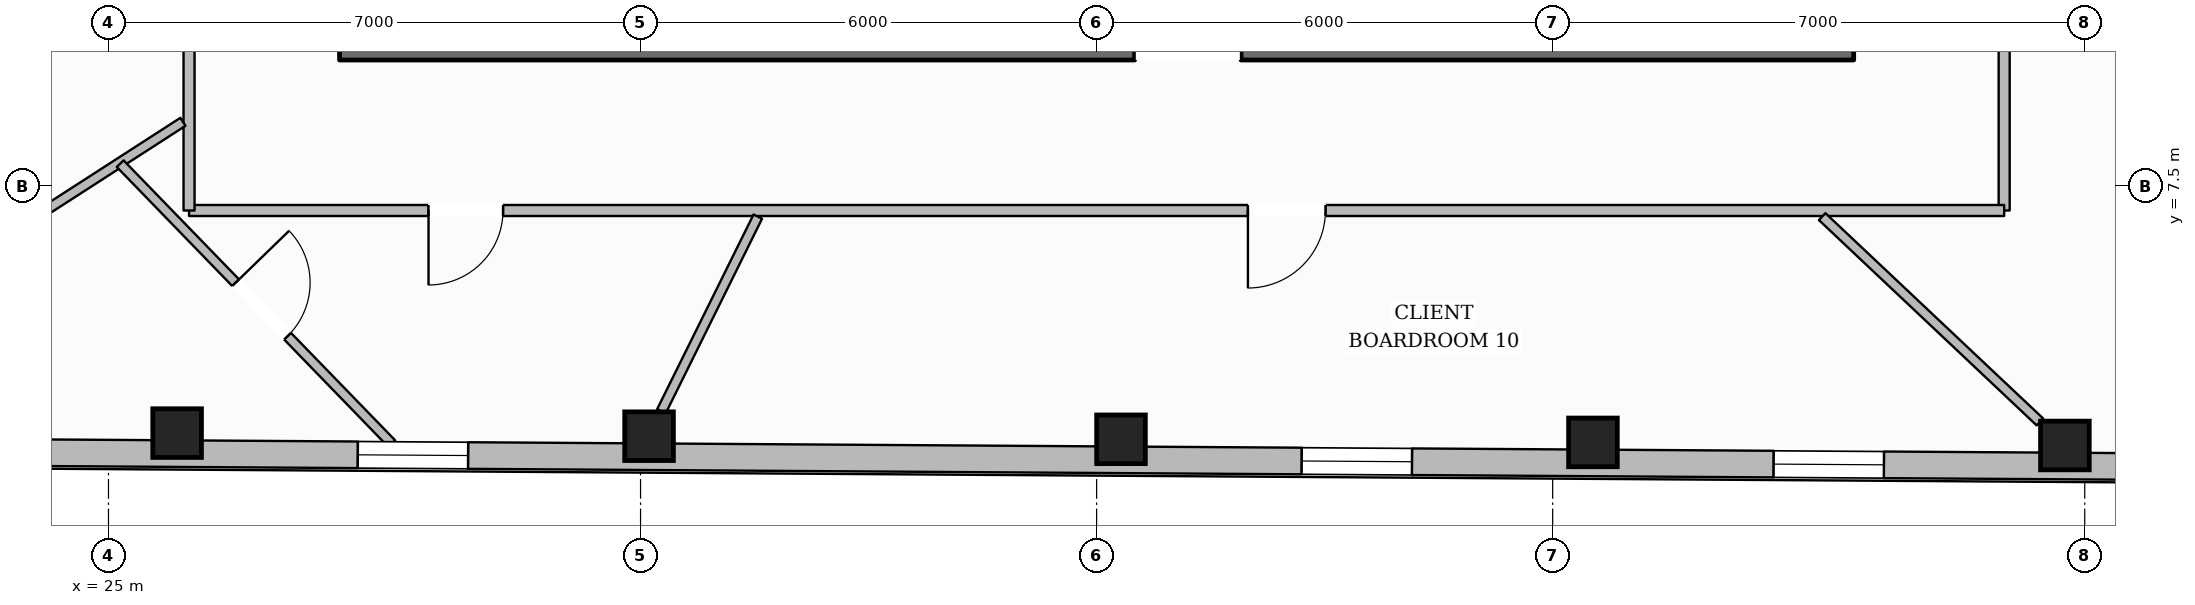
"""IFC4 building model, lengths in metres.
Left out: names, types, materials, properties, quantities, classifications, styles, units other than length and angle.
Written with IfcOpenShell. Run it as: python <this file> out.ifc"""

import sys

from ifc_helpers import new_model, si_unit, direction, frame, frame_2d, origin, origin_2d, place, context, subcontext, project, spatial, rectangle, hollow_rectangle, extrude, element, fill, save


model = new_model("IFC4")
c1 = context("Model", 3, precision=1e-05, world=origin(), true_north=direction((0.0, 1.0)))
c2 = subcontext(c1, "Body", "Model", "MODEL_VIEW")
j1 = project(units=[si_unit("LENGTHUNIT", "METRE"), si_unit("PLANEANGLEUNIT", "RADIAN")], contexts=[c1])
p1 = place(None, origin())
s1 = spatial("IfcSite", under=j1, at=p1, CompositionType="ELEMENT")
p2 = place(p1, origin())
s2 = spatial("IfcBuilding", under=s1, at=p2, CompositionType="ELEMENT")
p3 = place(p2, frame((0.0, 0.0, 195.8)))
s3 = spatial("IfcBuildingStorey", under=s2, at=p3, CompositionType="ELEMENT", Elevation=195.8)
p4 = place(p3, frame((28.04, 9.38, 0.0), z_axis=(0.0, 0.0, 1.0), x_axis=(1.0, 0.0, 0.0)))
e1 = element("IfcWall", 1, at=p4, inside=s3, PredefinedType="SOLIDWALL", context=c2, shape_type="SweptSolid", body=[
    extrude(rectangle(XDim=19.92, YDim=0.44, at=frame_2d((9.96, 0.0))), origin(), (0.0, 0.0, 1.0), 3.6),
])
p5 = place(p4, frame((10.46, 0.0, 0.0)))
e2 = element("IfcOpeningElement", 2, at=p5, cuts=e1, PredefinedType="OPENING", context=c2, shape_type="SweptSolid", body=[
    extrude(rectangle(XDim=1.4, YDim=2.2, at=frame_2d((0.7, 1.1))), frame((0.0, 0.23, 0.0), z_axis=(0.0, -1.0, 0.0), x_axis=(1.0, 0.0, 0.0)), (0.0, 0.0, 1.0), 0.46),
])
for number, where, z_axis, x_axis in (
    (3, (25.903, 4.251, 0.0), (0.0, 0.0, 1.0), (1.0, 0.0, 0.0)),
    (4, (32.112, 4.211, 0.0), (0.0, 0.0, 1.0), (1.0, 0.0, 0.0)),
    (5, (38.321, 4.17, 0.0), (0.0, 0.0, 1.0), (1.0, 0.0, 0.0)),
    (6, (44.53, 4.129, 0.0), (0.0, 0.0, 1.0), (1.0, 0.0, 0.0)),
    (7, (50.739, 4.088, 0.0), (0.0, 0.0, 1.0), (1.0, 0.0, 0.0)),
):
    element("IfcColumn", number, at=place(p3, frame(where, z_axis=z_axis, x_axis=x_axis)), inside=s3, PredefinedType="COLUMN", context=c2, shape_type="SweptSolid", body=[
        extrude(hollow_rectangle(XDim=0.64, YDim=0.64, WallThickness=0.028, at=origin_2d()), origin(), (0.0, 0.0, 1.0), 3.6),
    ])
p6 = place(p3, frame((57.425, 3.775, 0.0), z_axis=(0.0, 0.0, 1.0), x_axis=(-0.99997846495, 0.006562746083, 0.0)))
e8 = element("IfcWall", 8, at=p6, inside=s3, PredefinedType="STANDARD", context=c2, shape_type="SweptSolid", body=[
    extrude(rectangle(XDim=38.205, YDim=0.35, at=frame_2d((19.103, 0.0))), origin(), (0.0, 0.0, 1.0), 3.132),
])
p7 = place(p6, frame((33.904, 0.0, 0.65)))
e9 = element("IfcOpeningElement", 9, at=p7, cuts=e8, PredefinedType="OPENING", context=c2, shape_type="SweptSolid", body=[
    extrude(rectangle(XDim=1.45, YDim=1.75, at=frame_2d((0.725, 0.875))), frame((0.0, 0.185, 0.0), z_axis=(0.0, -1.0, 0.0), x_axis=(1.0, 0.0, 0.0)), (0.0, 0.0, 1.0), 0.37),
])
p8 = place(p6, frame((27.695, 0.0, 0.65)))
e10 = element("IfcOpeningElement", 10, at=p8, cuts=e8, PredefinedType="OPENING", context=c2, shape_type="SweptSolid", body=[
    extrude(rectangle(XDim=1.45, YDim=1.75, at=frame_2d((0.725, 0.875))), frame((0.0, 0.185, 0.0), z_axis=(0.0, -1.0, 0.0), x_axis=(1.0, 0.0, 0.0)), (0.0, 0.0, 1.0), 0.37),
])
p9 = place(p6, frame((15.276, 0.0, 0.65)))
e11 = element("IfcOpeningElement", 11, at=p9, cuts=e8, PredefinedType="OPENING", context=c2, shape_type="SweptSolid", body=[
    extrude(rectangle(XDim=1.45, YDim=1.75, at=frame_2d((0.725, 0.875))), frame((0.0, 0.185, 0.0), z_axis=(0.0, -1.0, 0.0), x_axis=(1.0, 0.0, 0.0)), (0.0, 0.0, 1.0), 0.37),
])
p10 = place(p6, frame((9.067, 0.0, 0.65)))
e12 = element("IfcOpeningElement", 12, at=p10, cuts=e8, PredefinedType="OPENING", context=c2, shape_type="SweptSolid", body=[
    extrude(rectangle(XDim=1.45, YDim=1.75, at=frame_2d((0.725, 0.875))), frame((0.0, 0.185, 0.0), z_axis=(0.0, -1.0, 0.0), x_axis=(1.0, 0.0, 0.0)), (0.0, 0.0, 1.0), 0.37),
])
p11 = place(p6, frame((2.858, 0.0, 0.65)))
e13 = element("IfcOpeningElement", 13, at=p11, cuts=e8, PredefinedType="OPENING", context=c2, shape_type="SweptSolid", body=[
    extrude(rectangle(XDim=1.45, YDim=1.75, at=frame_2d((0.725, 0.875))), frame((0.0, 0.185, 0.0), z_axis=(0.0, -1.0, 0.0), x_axis=(1.0, 0.0, 0.0)), (0.0, 0.0, 1.0), 0.37),
])
p12 = place(p3, frame((49.94, 15.1, 0.0), z_axis=(0.0, 0.0, 1.0), x_axis=(0.0, -1.0, 0.0)))
e14 = element("IfcWall", 14, at=p12, inside=s3, PredefinedType="PARTITIONING", context=c2, shape_type="SweptSolid", body=[
    extrude(rectangle(XDim=7.92, YDim=0.145, at=frame_2d((3.96, 0.0))), origin(), (0.0, 0.0, 1.0), 3.6),
])
p13 = place(p12, frame((3.26, 0.0, 0.0)))
e15 = element("IfcOpeningElement", 15, at=p13, cuts=e14, PredefinedType="OPENING", context=c2, shape_type="SweptSolid", body=[
    extrude(rectangle(XDim=1.4, YDim=2.2, at=frame_2d((0.7, 1.1))), frame((0.0, 0.083, 0.0), z_axis=(0.0, -1.0, 0.0), x_axis=(1.0, 0.0, 0.0)), (0.0, 0.0, 1.0), 0.165),
])
p14 = place(p3, frame((49.94, 7.18, 0.0), z_axis=(0.0, 0.0, 1.0), x_axis=(-1.0, 0.0, 0.0)))
e16 = element("IfcWall", 16, at=p14, inside=s3, PredefinedType="PARTITIONING", context=c2, shape_type="SweptSolid", body=[
    extrude(rectangle(XDim=23.88, YDim=0.145, at=frame_2d((11.94, 0.0))), origin(), (0.0, 0.0, 1.0), 3.6),
])
p15 = place(p14, frame((19.749, 0.0, 0.0)))
e17 = element("IfcOpeningElement", 17, at=p15, cuts=e16, PredefinedType="OPENING", context=c2, shape_type="SweptSolid", body=[
    extrude(rectangle(XDim=0.98, YDim=2.15, at=frame_2d((0.49, 1.075))), frame((0.0, 0.083, 0.0), z_axis=(0.0, -1.0, 0.0), x_axis=(1.0, 0.0, 0.0)), (0.0, 0.0, 1.0), 0.165),
])
p16 = place(p14, frame((8.929, 0.0, 0.0)))
e18 = element("IfcOpeningElement", 18, at=p16, cuts=e16, PredefinedType="OPENING", context=c2, shape_type="SweptSolid", body=[
    extrude(rectangle(XDim=1.02, YDim=2.15, at=frame_2d((0.51, 1.075))), frame((0.0, 0.083, 0.0), z_axis=(0.0, -1.0, 0.0), x_axis=(1.0, 0.0, 0.0)), (0.0, 0.0, 1.0), 0.165),
])
p17 = place(p3, frame((26.06, 7.18, 0.0), z_axis=(0.0, 0.0, 1.0), x_axis=(0.0, 1.0, 0.0)))
e19 = element("IfcWall", 19, at=p17, inside=s3, PredefinedType="PARTITIONING", context=c2, shape_type="SweptSolid", body=[
    extrude(rectangle(XDim=4.97, YDim=0.145, at=frame_2d((2.485, 0.0))), origin(), (0.0, 0.0, 1.0), 3.6),
])
p18 = place(p17, frame((2.306, 0.0, 0.0)))
e20 = element("IfcOpeningElement", 20, at=p18, cuts=e19, PredefinedType="OPENING", context=c2, shape_type="SweptSolid", body=[
    extrude(rectangle(XDim=1.4, YDim=2.2, at=frame_2d((0.7, 1.1))), frame((0.0, 0.083, 0.0), z_axis=(0.0, -1.0, 0.0), x_axis=(1.0, 0.0, 0.0)), (0.0, 0.0, 1.0), 0.165),
])
p19 = place(p3, frame((25.979, 8.347, 0.0), z_axis=(0.0, 0.0, 1.0), x_axis=(-0.840345568486, -0.542051035905, 0.0)))
e21 = element("IfcWall", 21, at=p19, inside=s3, PredefinedType="PARTITIONING", context=c2, shape_type="SweptSolid", body=[
    extrude(rectangle(XDim=7.113, YDim=0.125, at=frame_2d((3.557, 0.0))), origin(), (0.0, 0.0, 1.0), 3.141),
])
p20 = place(p3, frame((33.542, 7.1, 0.0), z_axis=(0.0, 0.0, 1.0), x_axis=(-0.443758619673, -0.896146353821, 0.0)))
e22 = element("IfcWall", 22, at=p20, inside=s3, PredefinedType="PARTITIONING", context=c2, shape_type="SweptSolid", body=[
    extrude(rectangle(XDim=2.858, YDim=0.125, at=frame_2d((1.429, 0.0))), origin(), (0.0, 0.0, 1.0), 3.6),
])
p21 = place(p3, frame((47.546, 7.1, 0.0), z_axis=(0.0, 0.0, 1.0), x_axis=(0.727539012219, -0.686066312903, 0.0)))
e23 = element("IfcWall", 23, at=p21, inside=s3, PredefinedType="PARTITIONING", context=c2, shape_type="SweptSolid", body=[
    extrude(rectangle(XDim=3.938, YDim=0.125, at=frame_2d((1.969, 0.0))), origin(), (0.0, 0.0, 1.0), 3.6),
])
p22 = place(p3, frame((25.154, 7.796, 0.0), z_axis=(0.0, 0.0, 1.0), x_axis=(0.696321168486, -0.717730332589, 0.0)))
e24 = element("IfcWall", 24, at=p22, inside=s3, PredefinedType="PARTITIONING", context=c2, shape_type="SweptSolid", body=[
    extrude(rectangle(XDim=5.132, YDim=0.125, at=frame_2d((2.566, 0.0))), origin(), (0.0, 0.0, 1.0), 3.6),
])
p23 = place(p22, frame((2.181, 0.0, 0.0)))
e25 = element("IfcOpeningElement", 25, at=p23, cuts=e24, PredefinedType="OPENING", context=c2, shape_type="SweptSolid", body=[
    extrude(rectangle(XDim=0.98, YDim=2.15, at=frame_2d((0.49, 1.075))), frame((0.0, 0.073, 0.0), z_axis=(0.0, -1.0, 0.0), x_axis=(1.0, 0.0, 0.0)), (0.0, 0.0, 1.0), 0.145),
])
p24 = place(p8, origin())
e26 = element("IfcWindow", 26, at=p24, inside=s3, PartitioningType="SINGLE_PANEL", PredefinedType="WINDOW", context=c2, shape_type="SweptSolid", body=[
    extrude(rectangle(XDim=1.45, YDim=1.75, at=frame_2d((0.725, 0.875))), frame((0.0, 0.03, 0.0), z_axis=(0.0, -1.0, 0.0), x_axis=(1.0, 0.0, 0.0)), (0.0, 0.0, 1.0), 0.06),
])
fill(e10, e26)
p25 = place(p9, origin())
e27 = element("IfcWindow", 27, at=p25, inside=s3, PartitioningType="SINGLE_PANEL", PredefinedType="WINDOW", context=c2, shape_type="SweptSolid", body=[
    extrude(rectangle(XDim=1.45, YDim=1.75, at=frame_2d((0.725, 0.875))), frame((0.0, 0.03, 0.0), z_axis=(0.0, -1.0, 0.0), x_axis=(1.0, 0.0, 0.0)), (0.0, 0.0, 1.0), 0.06),
])
fill(e11, e27)
p26 = place(p10, origin())
e28 = element("IfcWindow", 28, at=p26, inside=s3, PartitioningType="SINGLE_PANEL", PredefinedType="WINDOW", context=c2, shape_type="SweptSolid", body=[
    extrude(rectangle(XDim=1.45, YDim=1.75, at=frame_2d((0.725, 0.875))), frame((0.0, 0.03, 0.0), z_axis=(0.0, -1.0, 0.0), x_axis=(1.0, 0.0, 0.0)), (0.0, 0.0, 1.0), 0.06),
])
fill(e12, e28)
p27 = place(p15, origin())
e29 = element("IfcDoor", 29, at=p27, inside=s3, OperationType="SINGLE_SWING_RIGHT", PredefinedType="DOOR", context=c2, shape_type="SweptSolid", body=[
    extrude(rectangle(XDim=0.98, YDim=2.15, at=frame_2d((0.49, 1.075))), frame((0.0, 0.025, 0.0), z_axis=(0.0, -1.0, 0.0), x_axis=(1.0, 0.0, 0.0)), (0.0, 0.0, 1.0), 0.05),
])
fill(e17, e29)
p28 = place(p23, origin())
e30 = element("IfcDoor", 30, at=p28, inside=s3, OperationType="SINGLE_SWING_LEFT", PredefinedType="DOOR", context=c2, shape_type="SweptSolid", body=[
    extrude(rectangle(XDim=0.98, YDim=2.15, at=frame_2d((0.49, 1.075))), frame((0.0, 0.025, 0.0), z_axis=(0.0, -1.0, 0.0), x_axis=(1.0, 0.0, 0.0)), (0.0, 0.0, 1.0), 0.05),
])
fill(e25, e30)
p29 = place(p16, origin())
e31 = element("IfcDoor", 31, at=p29, inside=s3, OperationType="SINGLE_SWING_RIGHT", PredefinedType="DOOR", context=c2, shape_type="SweptSolid", body=[
    extrude(rectangle(XDim=1.02, YDim=2.15, at=frame_2d((0.51, 1.075))), frame((0.0, 0.025, 0.0), z_axis=(0.0, -1.0, 0.0), x_axis=(1.0, 0.0, 0.0)), (0.0, 0.0, 1.0), 0.05),
])
fill(e18, e31)
save(model, sys.argv[1])
